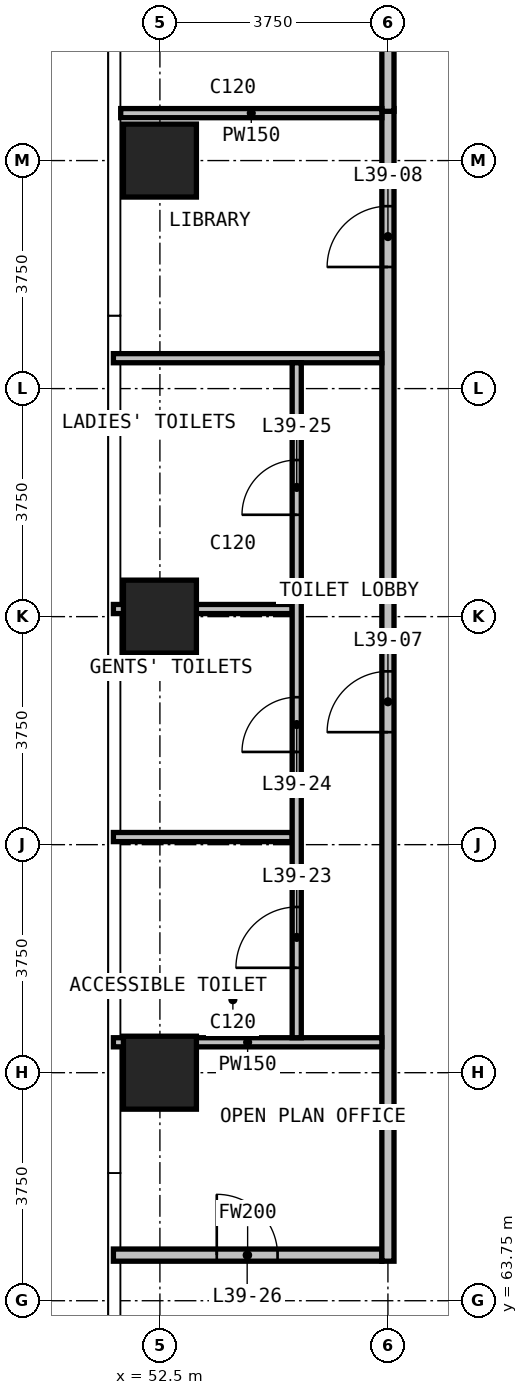
"""IFC4 building model, lengths in metres.
Left out: names, types, materials, properties, quantities, classifications, styles, units other than length and angle.
Written with IfcOpenShell. Run it as: python <this file> out.ifc"""

import sys

from ifc_helpers import new_model, si_unit, direction, frame, frame_2d, origin, origin_2d, place, context, subcontext, project, spatial, rectangle, extrude, element, fill, save


model = new_model("IFC4")
c1 = context("Model", 3, precision=1e-05, world=origin(), true_north=direction((0.0, 1.0)))
c2 = subcontext(c1, "Body", "Model", "MODEL_VIEW")
j1 = project(units=[si_unit("LENGTHUNIT", "METRE"), si_unit("PLANEANGLEUNIT", "RADIAN")], contexts=[c1])
p1 = place(None, origin())
s1 = spatial("IfcSite", under=j1, at=p1, CompositionType="ELEMENT")
p2 = place(p1, origin())
s2 = spatial("IfcBuilding", under=s1, at=p2, CompositionType="ELEMENT")
p3 = place(p2, frame((0.0, 0.0, 154.9)))
s3 = spatial("IfcBuildingStorey", under=s2, at=p3, CompositionType="ELEMENT", Elevation=154.9)
for number, where, z_axis, x_axis in (
    (1, (52.5, 67.5, 0.0), (0.0, 0.0, 1.0), (1.0, 0.0, 0.0)),
    (2, (52.5, 75.0, 0.0), (0.0, 0.0, 1.0), (1.0, 0.0, 0.0)),
    (3, (52.5, 82.5, 0.0), (0.0, 0.0, 1.0), (1.0, 0.0, 0.0)),
):
    element("IfcColumn", number, at=place(p3, frame(where, z_axis=z_axis, x_axis=x_axis)), inside=s3, PredefinedType="COLUMN", context=c2, shape_type="SweptSolid", body=[
        extrude(rectangle(XDim=1.2, YDim=1.2, at=origin_2d()), origin(), (0.0, 0.0, 1.0), 3.6),
    ])
p4 = place(p3, frame((51.735, 64.5, 0.0), z_axis=(0.0, 0.0, 1.0), x_axis=(1.0, 0.0, 0.0)))
e4 = element("IfcWall", 4, at=p4, inside=s3, PredefinedType="PARTITIONING", context=c2, shape_type="SweptSolid", body=[
    extrude(rectangle(XDim=4.415, YDim=0.2, at=frame_2d((2.208, 0.0))), origin(), (0.0, 0.0, 1.0), 3.3),
])
p5 = place(p4, frame((1.7, 0.0, 0.0)))
e5 = element("IfcOpeningElement", 5, at=p5, cuts=e4, PredefinedType="OPENING", context=c2, shape_type="SweptSolid", body=[
    extrude(rectangle(XDim=1.0, YDim=2.2, at=frame_2d((0.5, 1.1))), frame((0.0, 0.11, 0.0), z_axis=(0.0, -1.0, 0.0), x_axis=(1.0, 0.0, 0.0)), (0.0, 0.0, 1.0), 0.22),
])
p6 = place(p3, frame((56.25, 64.4, 0.0), z_axis=(0.0, 0.0, 1.0), x_axis=(0.0, 1.0, 0.0)))
e6 = element("IfcWall", 6, at=p6, inside=s3, PredefinedType="PARTITIONING", context=c2, shape_type="SweptSolid", body=[
    extrude(rectangle(XDim=18.955, YDim=0.2, at=frame_2d((9.478, 0.0))), origin(), (0.0, 0.0, 1.0), 3.3),
])
p7 = place(p6, frame((8.7, 0.0, 0.0)))
e7 = element("IfcOpeningElement", 7, at=p7, cuts=e6, PredefinedType="OPENING", context=c2, shape_type="SweptSolid", body=[
    extrude(rectangle(XDim=1.0, YDim=2.2, at=frame_2d((0.5, 1.1))), frame((0.0, 0.11, 0.0), z_axis=(0.0, -1.0, 0.0), x_axis=(1.0, 0.0, 0.0)), (0.0, 0.0, 1.0), 0.22),
])
p8 = place(p6, frame((16.35, 0.0, 0.0)))
e8 = element("IfcOpeningElement", 8, at=p8, cuts=e6, PredefinedType="OPENING", context=c2, shape_type="SweptSolid", body=[
    extrude(rectangle(XDim=1.0, YDim=2.2, at=frame_2d((0.5, 1.1))), frame((0.0, 0.11, 0.0), z_axis=(0.0, -1.0, 0.0), x_axis=(1.0, 0.0, 0.0)), (0.0, 0.0, 1.0), 0.22),
])
p9 = place(p3, frame((56.25, 83.31, 0.0), z_axis=(0.0, 0.0, 1.0), x_axis=(0.0, 1.0, 0.0)))
e9 = element("IfcWall", 9, at=p9, inside=s3, PredefinedType="PARTITIONING", context=c2, shape_type="SweptSolid", body=[
    extrude(rectangle(XDim=7.335, YDim=0.2, at=frame_2d((3.667, 0.0))), origin(), (0.0, 0.0, 1.0), 3.3),
])
p10 = place(p3, frame((51.735, 68.0, 0.0), z_axis=(0.0, 0.0, 1.0), x_axis=(1.0, 0.0, 0.0)))
e10 = element("IfcWall", 10, at=p10, inside=s3, PredefinedType="PARTITIONING", context=c2, shape_type="SweptSolid", body=[
    extrude(rectangle(XDim=4.415, YDim=0.15, at=frame_2d((2.208, 0.0))), origin(), (0.0, 0.0, 1.0), 3.3),
])
for number, where, z_axis, x_axis in (
    (11, (51.735, 71.375, 0.0), (0.0, 0.0, 1.0), (1.0, 0.0, 0.0)),
    (12, (51.735, 75.125, 0.0), (0.0, 0.0, 1.0), (1.0, 0.0, 0.0)),
):
    element("IfcWall", number, at=place(p3, frame(where, z_axis=z_axis, x_axis=x_axis)), inside=s3, PredefinedType="PARTITIONING", context=c2, shape_type="SweptSolid", body=[
        extrude(rectangle(XDim=2.94, YDim=0.15, at=frame_2d((1.47, 0.0))), origin(), (0.0, 0.0, 1.0), 3.3),
    ])
p11 = place(p3, frame((51.735, 79.25, 0.0), z_axis=(0.0, 0.0, 1.0), x_axis=(1.0, 0.0, 0.0)))
e13 = element("IfcWall", 13, at=p11, inside=s3, PredefinedType="PARTITIONING", context=c2, shape_type="SweptSolid", body=[
    extrude(rectangle(XDim=4.415, YDim=0.15, at=frame_2d((2.208, 0.0))), origin(), (0.0, 0.0, 1.0), 3.3),
])
p12 = place(p3, frame((51.855, 83.28, 0.0), z_axis=(0.0, 0.0, 1.0), x_axis=(1.0, 0.0, 0.0)))
e14 = element("IfcWall", 14, at=p12, inside=s3, PredefinedType="PARTITIONING", context=c2, shape_type="SweptSolid", body=[
    extrude(rectangle(XDim=4.295, YDim=0.15, at=frame_2d((2.147, 0.0))), origin(), (0.0, 0.0, 1.0), 3.3),
])
p13 = place(p3, frame((54.75, 68.075, 0.0), z_axis=(0.0, 0.0, 1.0), x_axis=(0.0, 1.0, 0.0)))
e15 = element("IfcWall", 15, at=p13, inside=s3, PredefinedType="PARTITIONING", context=c2, shape_type="SweptSolid", body=[
    extrude(rectangle(XDim=11.1, YDim=0.15, at=frame_2d((5.55, 0.0))), origin(), (0.0, 0.0, 1.0), 3.3),
])
p14 = place(p13, frame((1.15, 0.0, 0.0)))
e16 = element("IfcOpeningElement", 16, at=p14, cuts=e15, PredefinedType="OPENING", context=c2, shape_type="SweptSolid", body=[
    extrude(rectangle(XDim=1.0, YDim=2.2, at=frame_2d((0.5, 1.1))), frame((0.0, 0.085, 0.0), z_axis=(0.0, -1.0, 0.0), x_axis=(1.0, 0.0, 0.0)), (0.0, 0.0, 1.0), 0.17),
])
p15 = place(p13, frame((4.7, 0.0, 0.0)))
e17 = element("IfcOpeningElement", 17, at=p15, cuts=e15, PredefinedType="OPENING", context=c2, shape_type="SweptSolid", body=[
    extrude(rectangle(XDim=0.9, YDim=2.2, at=frame_2d((0.45, 1.1))), frame((0.0, 0.085, 0.0), z_axis=(0.0, -1.0, 0.0), x_axis=(1.0, 0.0, 0.0)), (0.0, 0.0, 1.0), 0.17),
])
p16 = place(p13, frame((8.6, 0.0, 0.0)))
e18 = element("IfcOpeningElement", 18, at=p16, cuts=e15, PredefinedType="OPENING", context=c2, shape_type="SweptSolid", body=[
    extrude(rectangle(XDim=0.9, YDim=2.2, at=frame_2d((0.45, 1.1))), frame((0.0, 0.085, 0.0), z_axis=(0.0, -1.0, 0.0), x_axis=(1.0, 0.0, 0.0)), (0.0, 0.0, 1.0), 0.17),
])
p17 = place(p7, origin())
e19 = element("IfcDoor", 19, at=p17, inside=s3, OperationType="SINGLE_SWING_RIGHT", PredefinedType="DOOR", context=c2, shape_type="SweptSolid", body=[
    extrude(rectangle(XDim=1.0, YDim=2.2, at=frame_2d((0.5, 1.1))), frame((0.0, 0.025, 0.0), z_axis=(0.0, -1.0, 0.0), x_axis=(1.0, 0.0, 0.0)), (0.0, 0.0, 1.0), 0.05),
])
fill(e7, e19)
p18 = place(p8, origin())
e20 = element("IfcDoor", 20, at=p18, inside=s3, OperationType="SINGLE_SWING_LEFT", PredefinedType="DOOR", context=c2, shape_type="SweptSolid", body=[
    extrude(rectangle(XDim=1.0, YDim=2.2, at=frame_2d((0.5, 1.1))), frame((0.0, 0.025, 0.0), z_axis=(0.0, -1.0, 0.0), x_axis=(1.0, 0.0, 0.0)), (0.0, 0.0, 1.0), 0.05),
])
fill(e8, e20)
p19 = place(p14, origin())
e21 = element("IfcDoor", 21, at=p19, inside=s3, OperationType="SINGLE_SWING_LEFT", PredefinedType="DOOR", context=c2, shape_type="SweptSolid", body=[
    extrude(rectangle(XDim=1.0, YDim=2.2, at=frame_2d((0.5, 1.1))), frame((0.0, 0.025, 0.0), z_axis=(0.0, -1.0, 0.0), x_axis=(1.0, 0.0, 0.0)), (0.0, 0.0, 1.0), 0.05),
])
fill(e16, e21)
p20 = place(p15, origin())
e22 = element("IfcDoor", 22, at=p20, inside=s3, OperationType="SINGLE_SWING_LEFT", PredefinedType="DOOR", context=c2, shape_type="SweptSolid", body=[
    extrude(rectangle(XDim=0.9, YDim=2.2, at=frame_2d((0.45, 1.1))), frame((0.0, 0.025, 0.0), z_axis=(0.0, -1.0, 0.0), x_axis=(1.0, 0.0, 0.0)), (0.0, 0.0, 1.0), 0.05),
])
fill(e17, e22)
p21 = place(p16, origin())
e23 = element("IfcDoor", 23, at=p21, inside=s3, OperationType="SINGLE_SWING_RIGHT", PredefinedType="DOOR", context=c2, shape_type="SweptSolid", body=[
    extrude(rectangle(XDim=0.9, YDim=2.2, at=frame_2d((0.45, 1.1))), frame((0.0, 0.025, 0.0), z_axis=(0.0, -1.0, 0.0), x_axis=(1.0, 0.0, 0.0)), (0.0, 0.0, 1.0), 0.05),
])
fill(e18, e23)
p22 = place(p5, origin())
e24 = element("IfcDoor", 24, at=p22, inside=s3, OperationType="SINGLE_SWING_LEFT", PredefinedType="DOOR", context=c2, shape_type="SweptSolid", body=[
    extrude(rectangle(XDim=1.0, YDim=2.2, at=frame_2d((0.5, 1.1))), frame((0.0, 0.025, 0.0), z_axis=(0.0, -1.0, 0.0), x_axis=(1.0, 0.0, 0.0)), (0.0, 0.0, 1.0), 0.05),
])
fill(e5, e24)
save(model, sys.argv[1])
